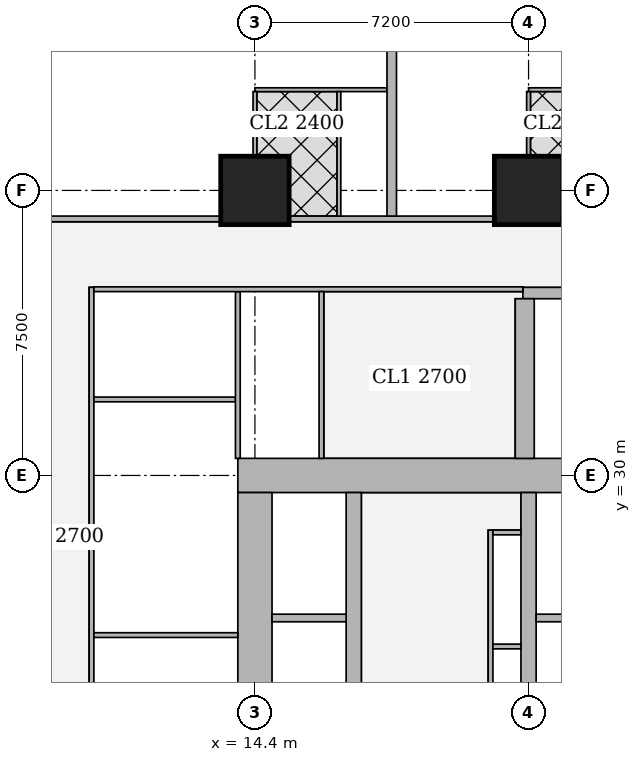
"""IFC4 building model, lengths in metres.
Left out: names, types, materials, properties, quantities, classifications, styles, units other than length and angle.
Written with IfcOpenShell. Run it as: python <this file> out.ifc"""

import sys

from ifc_helpers import new_model, si_unit, direction, frame, frame_2d, origin, origin_2d, place, context, subcontext, project, spatial, rectangle, extrude, element, fill, save


model = new_model("IFC4")
c1 = context("Model", 3, precision=1e-05, world=origin(), true_north=direction((0.0, 1.0)))
c2 = subcontext(c1, "Body", "Model", "MODEL_VIEW")
j1 = project(units=[si_unit("LENGTHUNIT", "METRE"), si_unit("PLANEANGLEUNIT", "RADIAN")], contexts=[c1])
p1 = place(None, origin())
s1 = spatial("IfcSite", under=j1, at=p1, CompositionType="ELEMENT")
p2 = place(p1, origin())
s2 = spatial("IfcBuilding", under=s1, at=p2, CompositionType="ELEMENT")
p3 = place(p2, frame((0.0, 0.0, 53.75)))
s3 = spatial("IfcBuildingStorey", under=s2, at=p3, CompositionType="ELEMENT", Elevation=53.75)
for number, where, z_axis, x_axis in (
    (1, (14.4, 37.5, 0.0), (0.0, 0.0, 1.0), (1.0, 0.0, 0.0)),
    (2, (21.6, 37.5, 0.0), (0.0, 0.0, 1.0), (1.0, 0.0, 0.0)),
):
    element("IfcColumn", number, at=place(p3, frame(where, z_axis=z_axis, x_axis=x_axis)), inside=s3, PredefinedType="COLUMN", context=c2, shape_type="SweptSolid", body=[
        extrude(rectangle(XDim=1.8, YDim=1.8, at=origin_2d()), origin(), (0.0, 0.0, 1.0), 3.75),
    ])
p4 = place(p3, frame((13.95, 30.0, 0.0), z_axis=(0.0, 0.0, 1.0), x_axis=(1.0, 0.0, 0.0)))
e3 = element("IfcWall", 3, at=p4, inside=s3, PredefinedType="SHEAR", context=c2, shape_type="SweptSolid", body=[
    extrude(rectangle(XDim=15.3, YDim=0.9, at=frame_2d((7.65, 0.0))), origin(), (0.0, 0.0, 1.0), 3.75),
])
p5 = place(p4, frame((4.45, 0.0, 0.0)))
e4 = element("IfcOpeningElement", 4, at=p5, cuts=e3, PredefinedType="OPENING", context=c2, shape_type="SweptSolid", body=[
    extrude(rectangle(XDim=1.8, YDim=2.1, at=frame_2d((0.9, 1.05))), frame((0.0, 0.46, 0.0), z_axis=(0.0, -1.0, 0.0), x_axis=(1.0, 0.0, 0.0)), (0.0, 0.0, 1.0), 0.92),
])
p6 = place(p4, frame((10.7, 0.0, 0.0)))
e5 = element("IfcOpeningElement", 5, at=p6, cuts=e3, PredefinedType="OPENING", context=c2, shape_type="SweptSolid", body=[
    extrude(rectangle(XDim=1.1, YDim=2.1, at=frame_2d((0.55, 1.05))), frame((0.0, 0.46, 0.0), z_axis=(0.0, -1.0, 0.0), x_axis=(1.0, 0.0, 0.0)), (0.0, 0.0, 1.0), 0.92),
])
p7 = place(p3, frame((14.4, 15.45, 0.0), z_axis=(0.0, 0.0, 1.0), x_axis=(0.0, 1.0, 0.0)))
e6 = element("IfcWall", 6, at=p7, inside=s3, PredefinedType="SHEAR", context=c2, shape_type="SweptSolid", body=[
    extrude(rectangle(XDim=14.1, YDim=0.9, at=frame_2d((7.05, 0.0))), origin(), (0.0, 0.0, 1.0), 3.75),
])
p8 = place(p3, frame((17.0, 15.45, 0.0), z_axis=(0.0, 0.0, 1.0), x_axis=(0.0, 1.0, 0.0)))
e7 = element("IfcWall", 7, at=p8, inside=s3, PredefinedType="SHEAR", context=c2, shape_type="SweptSolid", body=[
    extrude(rectangle(XDim=14.1, YDim=0.4, at=frame_2d((7.05, 0.0))), origin(), (0.0, 0.0, 1.0), 3.75),
])
p9 = place(p8, frame((0.875, 0.0, 0.0)))
e8 = element("IfcOpeningElement", 8, at=p9, cuts=e7, PredefinedType="OPENING", context=c2, shape_type="SweptSolid", body=[
    extrude(rectangle(XDim=1.1, YDim=2.1, at=frame_2d((0.55, 1.05))), frame((0.0, 0.21, 0.0), z_axis=(0.0, -1.0, 0.0), x_axis=(1.0, 0.0, 0.0)), (0.0, 0.0, 1.0), 0.42),
])
p10 = place(p8, frame((4.625, 0.0, 0.0)))
e9 = element("IfcOpeningElement", 9, at=p10, cuts=e7, PredefinedType="OPENING", context=c2, shape_type="SweptSolid", body=[
    extrude(rectangle(XDim=1.1, YDim=2.1, at=frame_2d((0.55, 1.05))), frame((0.0, 0.21, 0.0), z_axis=(0.0, -1.0, 0.0), x_axis=(1.0, 0.0, 0.0)), (0.0, 0.0, 1.0), 0.42),
])
p11 = place(p8, frame((8.375, 0.0, 0.0)))
e10 = element("IfcOpeningElement", 10, at=p11, cuts=e7, PredefinedType="OPENING", context=c2, shape_type="SweptSolid", body=[
    extrude(rectangle(XDim=1.1, YDim=2.1, at=frame_2d((0.55, 1.05))), frame((0.0, 0.21, 0.0), z_axis=(0.0, -1.0, 0.0), x_axis=(1.0, 0.0, 0.0)), (0.0, 0.0, 1.0), 0.42),
])
p12 = place(p8, frame((12.125, 0.0, 0.0)))
e11 = element("IfcOpeningElement", 11, at=p12, cuts=e7, PredefinedType="OPENING", context=c2, shape_type="SweptSolid", body=[
    extrude(rectangle(XDim=1.1, YDim=2.1, at=frame_2d((0.55, 1.05))), frame((0.0, 0.21, 0.0), z_axis=(0.0, -1.0, 0.0), x_axis=(1.0, 0.0, 0.0)), (0.0, 0.0, 1.0), 0.42),
])
p13 = place(p3, frame((21.6, 15.45, 0.0), z_axis=(0.0, 0.0, 1.0), x_axis=(0.0, 1.0, 0.0)))
e12 = element("IfcWall", 12, at=p13, inside=s3, PredefinedType="SHEAR", context=c2, shape_type="SweptSolid", body=[
    extrude(rectangle(XDim=14.1, YDim=0.4, at=frame_2d((7.05, 0.0))), origin(), (0.0, 0.0, 1.0), 3.75),
])
p14 = place(p3, frame((21.45, 34.8, 0.0), z_axis=(0.0, 0.0, 1.0), x_axis=(1.0, 0.0, 0.0)))
e13 = element("IfcWall", 13, at=p14, inside=s3, PredefinedType="SHEAR", context=c2, shape_type="SweptSolid", body=[
    extrude(rectangle(XDim=7.5, YDim=0.3, at=frame_2d((3.75, 0.0))), origin(), (0.0, 0.0, 1.0), 3.75),
])
p15 = place(p14, frame((0.5, 0.0, 0.0)))
e14 = element("IfcOpeningElement", 14, at=p15, cuts=e13, PredefinedType="OPENING", context=c2, shape_type="SweptSolid", body=[
    extrude(rectangle(XDim=1.1, YDim=2.1, at=frame_2d((0.55, 1.05))), frame((0.0, 0.16, 0.0), z_axis=(0.0, -1.0, 0.0), x_axis=(1.0, 0.0, 0.0)), (0.0, 0.0, 1.0), 0.32),
])
p16 = place(p3, frame((21.5, 30.45, 0.0), z_axis=(0.0, 0.0, 1.0), x_axis=(0.0, 1.0, 0.0)))
e15 = element("IfcWall", 15, at=p16, inside=s3, PredefinedType="SHEAR", context=c2, shape_type="SweptSolid", body=[
    extrude(rectangle(XDim=4.2, YDim=0.5, at=frame_2d((2.1, 0.0))), origin(), (0.0, 0.0, 1.0), 3.75),
])
p17 = place(p3, frame((8.1, 36.75, 0.0), z_axis=(0.0, 0.0, 1.0), x_axis=(1.0, 0.0, 0.0)))
e16 = element("IfcWall", 16, at=p17, inside=s3, PredefinedType="SOLIDWALL", context=c2, shape_type="SweptSolid", body=[
    extrude(rectangle(XDim=5.399, YDim=0.15, at=frame_2d((2.699, 0.0))), origin(), (0.0, 0.0, 1.0), 3.5),
])
p18 = place(p17, frame((2.725, 0.0, 0.0)))
e17 = element("IfcOpeningElement", 17, at=p18, cuts=e16, PredefinedType="OPENING", context=c2, shape_type="SweptSolid", body=[
    extrude(rectangle(XDim=1.0, YDim=2.1, at=frame_2d((0.5, 1.05))), frame((0.0, 0.085, 0.0), z_axis=(0.0, -1.0, 0.0), x_axis=(1.0, 0.0, 0.0)), (0.0, 0.0, 1.0), 0.17),
])
p19 = place(p3, frame((15.301, 36.75, 0.0), z_axis=(0.0, 0.0, 1.0), x_axis=(1.0, 0.0, 0.0)))
e18 = element("IfcWall", 18, at=p19, inside=s3, PredefinedType="SOLIDWALL", context=c2, shape_type="SweptSolid", body=[
    extrude(rectangle(XDim=5.398, YDim=0.15, at=frame_2d((2.699, 0.0))), origin(), (0.0, 0.0, 1.0), 3.5),
])
p20 = place(p19, frame((3.599, 0.0, 0.0)))
e19 = element("IfcOpeningElement", 19, at=p20, cuts=e18, PredefinedType="OPENING", context=c2, shape_type="SweptSolid", body=[
    extrude(rectangle(XDim=1.0, YDim=2.1, at=frame_2d((0.5, 1.05))), frame((0.0, 0.085, 0.0), z_axis=(0.0, -1.0, 0.0), x_axis=(1.0, 0.0, 0.0)), (0.0, 0.0, 1.0), 0.17),
])
p21 = place(p3, frame((14.4, 40.15, 0.0), z_axis=(0.0, 0.0, 1.0), x_axis=(1.0, 0.0, 0.0)))
e20 = element("IfcWall", 20, at=p21, inside=s3, PredefinedType="PARTITIONING", context=c2, shape_type="SweptSolid", body=[
    extrude(rectangle(XDim=3.475, YDim=0.1, at=frame_2d((1.738, 0.0))), origin(), (0.0, 0.0, 1.0), 3.5),
])
p22 = place(p21, frame((0.655, 0.0, 0.0)))
e21 = element("IfcOpeningElement", 21, at=p22, cuts=e20, PredefinedType="OPENING", context=c2, shape_type="SweptSolid", body=[
    extrude(rectangle(XDim=0.9, YDim=2.1, at=frame_2d((0.45, 1.05))), frame((0.0, 0.06, 0.0), z_axis=(0.0, -1.0, 0.0), x_axis=(1.0, 0.0, 0.0)), (0.0, 0.0, 1.0), 0.12),
])
p23 = place(p21, frame((2.425, 0.0, 0.0)))
e22 = element("IfcOpeningElement", 22, at=p23, cuts=e20, PredefinedType="OPENING", context=c2, shape_type="SweptSolid", body=[
    extrude(rectangle(XDim=0.9, YDim=2.1, at=frame_2d((0.45, 1.05))), frame((0.0, 0.06, 0.0), z_axis=(0.0, -1.0, 0.0), x_axis=(1.0, 0.0, 0.0)), (0.0, 0.0, 1.0), 0.12),
])
p24 = place(p3, frame((14.4, 38.401, 0.0), z_axis=(0.0, 0.0, 1.0), x_axis=(0.0, 1.0, 0.0)))
e23 = element("IfcWall", 23, at=p24, inside=s3, PredefinedType="PARTITIONING", context=c2, shape_type="SweptSolid", body=[
    extrude(rectangle(XDim=1.699, YDim=0.1, at=frame_2d((0.85, 0.0))), origin(), (0.0, 0.0, 1.0), 3.5),
])
p25 = place(p3, frame((16.61, 36.825, 0.0), z_axis=(0.0, 0.0, 1.0), x_axis=(0.0, 1.0, 0.0)))
e24 = element("IfcWall", 24, at=p25, inside=s3, PredefinedType="PARTITIONING", context=c2, shape_type="SweptSolid", body=[
    extrude(rectangle(XDim=3.275, YDim=0.1, at=frame_2d((1.638, 0.0))), origin(), (0.0, 0.0, 1.0), 3.5),
])
p26 = place(p3, frame((21.6, 40.15, 0.0), z_axis=(0.0, 0.0, 1.0), x_axis=(1.0, 0.0, 0.0)))
e25 = element("IfcWall", 25, at=p26, inside=s3, PredefinedType="PARTITIONING", context=c2, shape_type="SweptSolid", body=[
    extrude(rectangle(XDim=7.075, YDim=0.1, at=frame_2d((3.538, 0.0))), origin(), (0.0, 0.0, 1.0), 3.5),
])
p27 = place(p26, frame((0.655, 0.0, 0.0)))
e26 = element("IfcOpeningElement", 26, at=p27, cuts=e25, PredefinedType="OPENING", context=c2, shape_type="SweptSolid", body=[
    extrude(rectangle(XDim=0.9, YDim=2.1, at=frame_2d((0.45, 1.05))), frame((0.0, 0.06, 0.0), z_axis=(0.0, -1.0, 0.0), x_axis=(1.0, 0.0, 0.0)), (0.0, 0.0, 1.0), 0.12),
])
p28 = place(p26, frame((3.95, 0.0, 0.0)))
e27 = element("IfcOpeningElement", 27, at=p28, cuts=e25, PredefinedType="OPENING", context=c2, shape_type="SweptSolid", body=[
    extrude(rectangle(XDim=0.9, YDim=2.1, at=frame_2d((0.45, 1.05))), frame((0.0, 0.06, 0.0), z_axis=(0.0, -1.0, 0.0), x_axis=(1.0, 0.0, 0.0)), (0.0, 0.0, 1.0), 0.12),
])
p29 = place(p26, frame((2.455, 0.0, 0.0)))
e28 = element("IfcOpeningElement", 28, at=p29, cuts=e25, PredefinedType="OPENING", context=c2, shape_type="SweptSolid", body=[
    extrude(rectangle(XDim=0.9, YDim=2.1, at=frame_2d((0.45, 1.05))), frame((0.0, 0.06, 0.0), z_axis=(0.0, -1.0, 0.0), x_axis=(1.0, 0.0, 0.0)), (0.0, 0.0, 1.0), 0.12),
])
p30 = place(p26, frame((5.75, 0.0, 0.0)))
e29 = element("IfcOpeningElement", 29, at=p30, cuts=e25, PredefinedType="OPENING", context=c2, shape_type="SweptSolid", body=[
    extrude(rectangle(XDim=0.9, YDim=2.1, at=frame_2d((0.45, 1.05))), frame((0.0, 0.06, 0.0), z_axis=(0.0, -1.0, 0.0), x_axis=(1.0, 0.0, 0.0)), (0.0, 0.0, 1.0), 0.12),
])
p31 = place(p3, frame((21.6, 38.401, 0.0), z_axis=(0.0, 0.0, 1.0), x_axis=(0.0, 1.0, 0.0)))
e30 = element("IfcWall", 30, at=p31, inside=s3, PredefinedType="PARTITIONING", context=c2, shape_type="SweptSolid", body=[
    extrude(rectangle(XDim=1.699, YDim=0.1, at=frame_2d((0.85, 0.0))), origin(), (0.0, 0.0, 1.0), 3.5),
])
p32 = place(p3, frame((18.0, 36.825, 0.0), z_axis=(0.0, 0.0, 1.0), x_axis=(0.0, 1.0, 0.0)))
e31 = element("IfcWall", 31, at=p32, inside=s3, PredefinedType="SOLIDWALL", context=c2, shape_type="SweptSolid", body=[
    extrude(rectangle(XDim=4.525, YDim=0.25, at=frame_2d((2.263, 0.0))), origin(), (0.0, 0.0, 1.0), 3.5),
])
p33 = place(p3, frame((10.1, 10.05, 0.0), z_axis=(0.0, 0.0, 1.0), x_axis=(0.0, 1.0, 0.0)))
e32 = element("IfcWall", 32, at=p33, inside=s3, PredefinedType="PARTITIONING", context=c2, shape_type="SweptSolid", body=[
    extrude(rectangle(XDim=24.9, YDim=0.125, at=frame_2d((12.45, 0.0))), origin(), (0.0, 0.0, 1.0), 3.5),
])
p34 = place(p33, frame((1.675, 0.0, 0.0)))
e33 = element("IfcOpeningElement", 33, at=p34, cuts=e32, PredefinedType="OPENING", context=c2, shape_type="SweptSolid", body=[
    extrude(rectangle(XDim=1.0, YDim=2.1, at=frame_2d((0.5, 1.05))), frame((0.0, 0.073, 0.0), z_axis=(0.0, -1.0, 0.0), x_axis=(1.0, 0.0, 0.0)), (0.0, 0.0, 1.0), 0.145),
])
p35 = place(p33, frame((5.35, 0.0, 0.0)))
e34 = element("IfcOpeningElement", 34, at=p35, cuts=e32, PredefinedType="OPENING", context=c2, shape_type="SweptSolid", body=[
    extrude(rectangle(XDim=1.0, YDim=2.1, at=frame_2d((0.5, 1.05))), frame((0.0, 0.073, 0.0), z_axis=(0.0, -1.0, 0.0), x_axis=(1.0, 0.0, 0.0)), (0.0, 0.0, 1.0), 0.145),
])
p36 = place(p33, frame((11.05, 0.0, 0.0)))
e35 = element("IfcOpeningElement", 35, at=p36, cuts=e32, PredefinedType="OPENING", context=c2, shape_type="SweptSolid", body=[
    extrude(rectangle(XDim=1.0, YDim=2.1, at=frame_2d((0.5, 1.05))), frame((0.0, 0.073, 0.0), z_axis=(0.0, -1.0, 0.0), x_axis=(1.0, 0.0, 0.0)), (0.0, 0.0, 1.0), 0.145),
])
p37 = place(p33, frame((18.35, 0.0, 0.0)))
e36 = element("IfcOpeningElement", 36, at=p37, cuts=e32, PredefinedType="OPENING", context=c2, shape_type="SweptSolid", body=[
    extrude(rectangle(XDim=1.0, YDim=2.1, at=frame_2d((0.5, 1.05))), frame((0.0, 0.073, 0.0), z_axis=(0.0, -1.0, 0.0), x_axis=(1.0, 0.0, 0.0)), (0.0, 0.0, 1.0), 0.145),
])
p38 = place(p33, frame((22.925, 0.0, 0.0)))
e37 = element("IfcOpeningElement", 37, at=p38, cuts=e32, PredefinedType="OPENING", context=c2, shape_type="SweptSolid", body=[
    extrude(rectangle(XDim=1.0, YDim=2.1, at=frame_2d((0.5, 1.05))), frame((0.0, 0.073, 0.0), z_axis=(0.0, -1.0, 0.0), x_axis=(1.0, 0.0, 0.0)), (0.0, 0.0, 1.0), 0.145),
])
p39 = place(p3, frame((10.163, 25.8, 0.0), z_axis=(0.0, 0.0, 1.0), x_axis=(1.0, 0.0, 0.0)))
e38 = element("IfcWall", 38, at=p39, inside=s3, PredefinedType="PARTITIONING", context=c2, shape_type="SweptSolid", body=[
    extrude(rectangle(XDim=3.787, YDim=0.125, at=frame_2d((1.894, 0.0))), origin(), (0.0, 0.0, 1.0), 3.5),
])
p40 = place(p3, frame((10.163, 32.0, 0.0), z_axis=(0.0, 0.0, 1.0), x_axis=(1.0, 0.0, 0.0)))
e39 = element("IfcWall", 39, at=p40, inside=s3, PredefinedType="PARTITIONING", context=c2, shape_type="SweptSolid", body=[
    extrude(rectangle(XDim=3.725, YDim=0.125, at=frame_2d((1.862, 0.0))), origin(), (0.0, 0.0, 1.0), 3.5),
])
p41 = place(p3, frame((13.95, 30.45, 0.0), z_axis=(0.0, 0.0, 1.0), x_axis=(0.0, 1.0, 0.0)))
e40 = element("IfcWall", 40, at=p41, inside=s3, PredefinedType="PARTITIONING", context=c2, shape_type="SweptSolid", body=[
    extrude(rectangle(XDim=4.387, YDim=0.125, at=frame_2d((2.193, 0.0))), origin(), (0.0, 0.0, 1.0), 3.5),
])
p42 = place(p3, frame((10.163, 34.9, 0.0), z_axis=(0.0, 0.0, 1.0), x_axis=(1.0, 0.0, 0.0)))
e41 = element("IfcWall", 41, at=p42, inside=s3, PredefinedType="PARTITIONING", context=c2, shape_type="SweptSolid", body=[
    extrude(rectangle(XDim=11.287, YDim=0.125, at=frame_2d((5.644, 0.0))), origin(), (0.0, 0.0, 1.0), 3.5),
])
p43 = place(p42, frame((7.737, 0.0, 0.0)))
e42 = element("IfcOpeningElement", 42, at=p43, cuts=e41, PredefinedType="OPENING", context=c2, shape_type="SweptSolid", body=[
    extrude(rectangle(XDim=1.8, YDim=2.1, at=frame_2d((0.9, 1.05))), frame((0.0, 0.073, 0.0), z_axis=(0.0, -1.0, 0.0), x_axis=(1.0, 0.0, 0.0)), (0.0, 0.0, 1.0), 0.145),
])
p44 = place(p3, frame((16.15, 30.45, 0.0), z_axis=(0.0, 0.0, 1.0), x_axis=(0.0, 1.0, 0.0)))
e43 = element("IfcWall", 43, at=p44, inside=s3, PredefinedType="PARTITIONING", context=c2, shape_type="SweptSolid", body=[
    extrude(rectangle(XDim=4.387, YDim=0.125, at=frame_2d((2.193, 0.0))), origin(), (0.0, 0.0, 1.0), 3.5),
])
p45 = place(p44, frame((1.75, 0.0, 0.0)))
e44 = element("IfcOpeningElement", 44, at=p45, cuts=e43, PredefinedType="OPENING", context=c2, shape_type="SweptSolid", body=[
    extrude(rectangle(XDim=1.0, YDim=2.1, at=frame_2d((0.5, 1.05))), frame((0.0, 0.073, 0.0), z_axis=(0.0, -1.0, 0.0), x_axis=(1.0, 0.0, 0.0)), (0.0, 0.0, 1.0), 0.145),
])
p46 = place(p3, frame((20.6, 18.438, 0.0), z_axis=(0.0, 0.0, 1.0), x_axis=(0.0, 1.0, 0.0)))
e45 = element("IfcWall", 45, at=p46, inside=s3, PredefinedType="PARTITIONING", context=c2, shape_type="SweptSolid", body=[
    extrude(rectangle(XDim=10.124, YDim=0.125, at=frame_2d((5.062, 0.0))), origin(), (0.0, 0.0, 1.0), 3.5),
])
p47 = place(p46, frame((1.062, 0.0, 0.0)))
e46 = element("IfcOpeningElement", 46, at=p47, cuts=e45, PredefinedType="OPENING", context=c2, shape_type="SweptSolid", body=[
    extrude(rectangle(XDim=1.0, YDim=2.1, at=frame_2d((0.5, 1.05))), frame((0.0, 0.073, 0.0), z_axis=(0.0, -1.0, 0.0), x_axis=(1.0, 0.0, 0.0)), (0.0, 0.0, 1.0), 0.145),
])
p48 = place(p46, frame((4.562, 0.0, 0.0)))
e47 = element("IfcOpeningElement", 47, at=p48, cuts=e45, PredefinedType="OPENING", context=c2, shape_type="SweptSolid", body=[
    extrude(rectangle(XDim=1.0, YDim=2.1, at=frame_2d((0.5, 1.05))), frame((0.0, 0.073, 0.0), z_axis=(0.0, -1.0, 0.0), x_axis=(1.0, 0.0, 0.0)), (0.0, 0.0, 1.0), 0.145),
])
p49 = place(p46, frame((8.062, 0.0, 0.0)))
e48 = element("IfcOpeningElement", 48, at=p49, cuts=e45, PredefinedType="OPENING", context=c2, shape_type="SweptSolid", body=[
    extrude(rectangle(XDim=1.0, YDim=2.1, at=frame_2d((0.5, 1.05))), frame((0.0, 0.073, 0.0), z_axis=(0.0, -1.0, 0.0), x_axis=(1.0, 0.0, 0.0)), (0.0, 0.0, 1.0), 0.145),
])
for number, where, z_axis, x_axis in (
    (49, (20.663, 28.5, 0.0), (0.0, 0.0, 1.0), (1.0, 0.0, 0.0)),
    (50, (20.663, 25.5, 0.0), (0.0, 0.0, 1.0), (1.0, 0.0, 0.0)),
):
    element("IfcWall", number, at=place(p3, frame(where, z_axis=z_axis, x_axis=x_axis)), inside=s3, PredefinedType="PARTITIONING", context=c2, shape_type="SweptSolid", body=[
        extrude(rectangle(XDim=0.737, YDim=0.125, at=frame_2d((0.368, 0.0))), origin(), (0.0, 0.0, 1.0), 3.5),
    ])
p50 = place(p3, frame((14.85, 26.25, 0.0), z_axis=(0.0, 0.0, 1.0), x_axis=(1.0, 0.0, 0.0)))
e51 = element("IfcWall", 51, at=p50, inside=s3, PredefinedType="SOLIDWALL", context=c2, shape_type="SweptSolid", body=[
    extrude(rectangle(XDim=1.95, YDim=0.2, at=frame_2d((0.975, 0.0))), origin(), (0.0, 0.0, 1.0), 3.5),
])
p51 = place(p3, frame((21.8, 26.25, 0.0), z_axis=(0.0, 0.0, 1.0), x_axis=(1.0, 0.0, 0.0)))
e52 = element("IfcWall", 52, at=p51, inside=s3, PredefinedType="SOLIDWALL", context=c2, shape_type="SweptSolid", body=[
    extrude(rectangle(XDim=2.2, YDim=0.2, at=frame_2d((1.1, 0.0))), origin(), (0.0, 0.0, 1.0), 3.5),
])
p52 = place(p22, origin())
e53 = element("IfcDoor", 53, at=p52, inside=s3, OperationType="SINGLE_SWING_RIGHT", PredefinedType="DOOR", context=c2, shape_type="SweptSolid", body=[
    extrude(rectangle(XDim=0.9, YDim=2.1, at=frame_2d((0.45, 1.05))), frame((0.0, 0.025, 0.0), z_axis=(0.0, -1.0, 0.0), x_axis=(1.0, 0.0, 0.0)), (0.0, 0.0, 1.0), 0.05),
])
fill(e21, e53)
p53 = place(p23, origin())
e54 = element("IfcDoor", 54, at=p53, inside=s3, OperationType="SINGLE_SWING_LEFT", PredefinedType="DOOR", context=c2, shape_type="SweptSolid", body=[
    extrude(rectangle(XDim=0.9, YDim=2.1, at=frame_2d((0.45, 1.05))), frame((0.0, 0.025, 0.0), z_axis=(0.0, -1.0, 0.0), x_axis=(1.0, 0.0, 0.0)), (0.0, 0.0, 1.0), 0.05),
])
fill(e22, e54)
p54 = place(p18, origin())
e55 = element("IfcDoor", 55, at=p54, inside=s3, OperationType="SINGLE_SWING_LEFT", PredefinedType="DOOR", context=c2, shape_type="SweptSolid", body=[
    extrude(rectangle(XDim=1.0, YDim=2.1, at=frame_2d((0.5, 1.05))), frame((0.0, 0.025, 0.0), z_axis=(0.0, -1.0, 0.0), x_axis=(1.0, 0.0, 0.0)), (0.0, 0.0, 1.0), 0.05),
])
fill(e17, e55)
p55 = place(p27, origin())
e56 = element("IfcDoor", 56, at=p55, inside=s3, OperationType="SINGLE_SWING_RIGHT", PredefinedType="DOOR", context=c2, shape_type="SweptSolid", body=[
    extrude(rectangle(XDim=0.9, YDim=2.1, at=frame_2d((0.45, 1.05))), frame((0.0, 0.025, 0.0), z_axis=(0.0, -1.0, 0.0), x_axis=(1.0, 0.0, 0.0)), (0.0, 0.0, 1.0), 0.05),
])
fill(e26, e56)
p56 = place(p20, origin())
e57 = element("IfcDoor", 57, at=p56, inside=s3, OperationType="SINGLE_SWING_RIGHT", PredefinedType="DOOR", context=c2, shape_type="SweptSolid", body=[
    extrude(rectangle(XDim=1.0, YDim=2.1, at=frame_2d((0.5, 1.05))), frame((0.0, 0.025, 0.0), z_axis=(0.0, -1.0, 0.0), x_axis=(1.0, 0.0, 0.0)), (0.0, 0.0, 1.0), 0.05),
])
fill(e19, e57)
p57 = place(p37, origin())
e58 = element("IfcDoor", 58, at=p57, inside=s3, OperationType="SINGLE_SWING_LEFT", PredefinedType="DOOR", context=c2, shape_type="SweptSolid", body=[
    extrude(rectangle(XDim=1.0, YDim=2.1, at=frame_2d((0.5, 1.05))), frame((0.0, 0.025, 0.0), z_axis=(0.0, -1.0, 0.0), x_axis=(1.0, 0.0, 0.0)), (0.0, 0.0, 1.0), 0.05),
])
fill(e36, e58)
p58 = place(p38, origin())
e59 = element("IfcDoor", 59, at=p58, inside=s3, OperationType="SINGLE_SWING_LEFT", PredefinedType="DOOR", context=c2, shape_type="SweptSolid", body=[
    extrude(rectangle(XDim=1.0, YDim=2.1, at=frame_2d((0.5, 1.05))), frame((0.0, 0.025, 0.0), z_axis=(0.0, -1.0, 0.0), x_axis=(1.0, 0.0, 0.0)), (0.0, 0.0, 1.0), 0.05),
])
fill(e37, e59)
p59 = place(p45, origin())
e60 = element("IfcDoor", 60, at=p59, inside=s3, OperationType="SINGLE_SWING_RIGHT", PredefinedType="DOOR", context=c2, shape_type="SweptSolid", body=[
    extrude(rectangle(XDim=1.0, YDim=2.1, at=frame_2d((0.5, 1.05))), frame((0.0, 0.025, 0.0), z_axis=(0.0, -1.0, 0.0), x_axis=(1.0, 0.0, 0.0)), (0.0, 0.0, 1.0), 0.05),
])
fill(e44, e60)
p60 = place(p43, origin())
e61 = element("IfcDoor", 61, at=p60, inside=s3, OperationType="DOUBLE_DOOR_SINGLE_SWING", PredefinedType="DOOR", context=c2, shape_type="SweptSolid", body=[
    extrude(rectangle(XDim=1.8, YDim=2.1, at=frame_2d((0.9, 1.05))), frame((0.0, 0.025, 0.0), z_axis=(0.0, -1.0, 0.0), x_axis=(1.0, 0.0, 0.0)), (0.0, 0.0, 1.0), 0.05),
])
fill(e42, e61)
p61 = place(p49, origin())
e62 = element("IfcDoor", 62, at=p61, inside=s3, OperationType="SINGLE_SWING_RIGHT", PredefinedType="DOOR", context=c2, shape_type="SweptSolid", body=[
    extrude(rectangle(XDim=1.0, YDim=2.1, at=frame_2d((0.5, 1.05))), frame((0.0, 0.025, 0.0), z_axis=(0.0, -1.0, 0.0), x_axis=(1.0, 0.0, 0.0)), (0.0, 0.0, 1.0), 0.05),
])
fill(e48, e62)
p62 = place(p5, origin())
e63 = element("IfcDoor", 63, at=p62, inside=s3, OperationType="DOUBLE_DOOR_SINGLE_SWING", PredefinedType="DOOR", context=c2, shape_type="SweptSolid", body=[
    extrude(rectangle(XDim=1.8, YDim=2.1, at=frame_2d((0.9, 1.05))), frame((0.0, 0.025, 0.0), z_axis=(0.0, -1.0, 0.0), x_axis=(1.0, 0.0, 0.0)), (0.0, 0.0, 1.0), 0.05),
])
fill(e4, e63)
p63 = place(p11, origin())
e64 = element("IfcDoor", 64, at=p63, inside=s3, OperationType="DOUBLE_DOOR_SLIDING", PredefinedType="DOOR", context=c2, shape_type="SweptSolid", body=[
    extrude(rectangle(XDim=1.1, YDim=2.1, at=frame_2d((0.55, 1.05))), frame((0.0, 0.025, 0.0), z_axis=(0.0, -1.0, 0.0), x_axis=(1.0, 0.0, 0.0)), (0.0, 0.0, 1.0), 0.05),
])
fill(e10, e64)
p64 = place(p12, origin())
e65 = element("IfcDoor", 65, at=p64, inside=s3, OperationType="DOUBLE_DOOR_SLIDING", PredefinedType="DOOR", context=c2, shape_type="SweptSolid", body=[
    extrude(rectangle(XDim=1.1, YDim=2.1, at=frame_2d((0.55, 1.05))), frame((0.0, 0.025, 0.0), z_axis=(0.0, -1.0, 0.0), x_axis=(1.0, 0.0, 0.0)), (0.0, 0.0, 1.0), 0.05),
])
fill(e11, e65)
p65 = place(p15, origin())
e66 = element("IfcDoor", 66, at=p65, inside=s3, OperationType="SINGLE_SWING_RIGHT", PredefinedType="DOOR", context=c2, shape_type="SweptSolid", body=[
    extrude(rectangle(XDim=1.1, YDim=2.1, at=frame_2d((0.55, 1.05))), frame((0.0, 0.025, 0.0), z_axis=(0.0, -1.0, 0.0), x_axis=(1.0, 0.0, 0.0)), (0.0, 0.0, 1.0), 0.05),
])
fill(e14, e66)
save(model, sys.argv[1])
